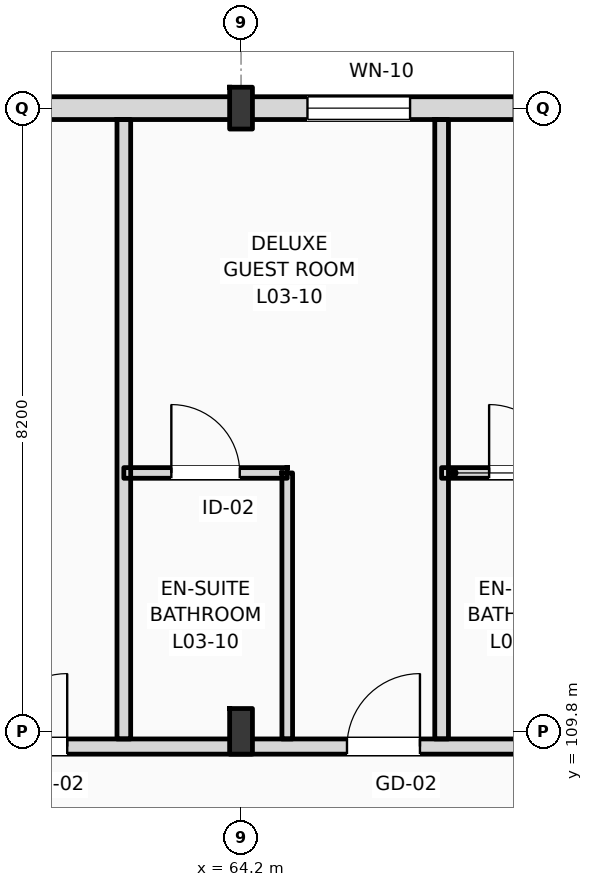
"""IFC4 building model, lengths in metres.
Left out: names, types, materials, properties, quantities, classifications, styles, units other than length and angle.
Written with IfcOpenShell. Run it as: python <this file> out.ifc"""

import sys

from ifc_helpers import new_model, si_unit, direction, frame, frame_2d, origin, origin_2d, place, context, subcontext, project, spatial, rectangle, i_section, extrude, element, fill, save


model = new_model("IFC4")
c1 = context("Model", 3, precision=1e-05, world=origin(), true_north=direction((0.0, 1.0)))
c2 = subcontext(c1, "Body", "Model", "MODEL_VIEW")
j1 = project(units=[si_unit("LENGTHUNIT", "METRE"), si_unit("PLANEANGLEUNIT", "RADIAN")], contexts=[c1])
p1 = place(None, origin())
s1 = spatial("IfcSite", under=j1, at=p1, CompositionType="ELEMENT")
p2 = place(p1, origin())
s2 = spatial("IfcBuilding", under=s1, at=p2, CompositionType="ELEMENT")
p3 = place(p2, frame((0.0, 0.0, 16.2)))
s3 = spatial("IfcBuildingStorey", under=s2, at=p3, CompositionType="ELEMENT", Elevation=16.2)
p4 = place(p3, frame((64.2, 109.8, 0.0), z_axis=(0.0, 0.0, 1.0), x_axis=(1.0, 0.0, 0.0)))
e1 = element("IfcColumn", 1, at=p4, inside=s3, PredefinedType="COLUMN", context=c2, shape_type="SweptSolid", body=[
    extrude(i_section(OverallWidth=0.3, OverallDepth=0.6, WebThickness=0.015, FlangeThickness=0.03, FilletRadius=0.027, at=origin_2d()), origin(), (0.0, 0.0, 1.0), 4.2),
])
p5 = place(p3, frame((64.2, 118.0, 0.0), z_axis=(0.0, 0.0, 1.0), x_axis=(1.0, 0.0, 0.0)))
e2 = element("IfcColumn", 2, at=p5, inside=s3, PredefinedType="COLUMN", context=c2, shape_type="SweptSolid", body=[
    extrude(i_section(OverallWidth=0.3, OverallDepth=0.55, WebThickness=0.015, FlangeThickness=0.029, FilletRadius=0.027, at=origin_2d()), origin(), (0.0, 0.0, 1.0), 4.2),
])
p6 = place(p3, frame((22.5, 118.0, 0.0), z_axis=(0.0, 0.0, 1.0), x_axis=(1.0, 0.0, 0.0)))
e3 = element("IfcWall", 3, at=p6, inside=s3, PredefinedType="STANDARD", context=c2, shape_type="SweptSolid", body=[
    extrude(rectangle(XDim=97.5, YDim=0.3, at=frame_2d((48.75, 0.0))), origin(), (0.0, 0.0, 1.0), 3.36),
])
p7 = place(p6, frame((3.721, 0.0, 0.9)))
e4 = element("IfcOpeningElement", 4, at=p7, cuts=e3, PredefinedType="OPENING", context=c2, shape_type="SweptSolid", body=[
    extrude(rectangle(XDim=0.9, YDim=1.8, at=frame_2d((0.45, 0.9))), frame((0.0, 0.16, 0.0), z_axis=(0.0, -1.0, 0.0), x_axis=(1.0, 0.0, 0.0)), (0.0, 0.0, 1.0), 0.32),
])
p8 = place(p6, frame((6.447, 0.0, 0.9)))
e5 = element("IfcOpeningElement", 5, at=p8, cuts=e3, PredefinedType="OPENING", context=c2, shape_type="SweptSolid", body=[
    extrude(rectangle(XDim=1.35, YDim=1.85, at=frame_2d((0.675, 0.925))), frame((0.0, 0.16, 0.0), z_axis=(0.0, -1.0, 0.0), x_axis=(1.0, 0.0, 0.0)), (0.0, 0.0, 1.0), 0.32),
])
p9 = place(p6, frame((11.363, 0.0, 0.9)))
e6 = element("IfcOpeningElement", 6, at=p9, cuts=e3, PredefinedType="OPENING", context=c2, shape_type="SweptSolid", body=[
    extrude(rectangle(XDim=1.5, YDim=1.9, at=frame_2d((0.75, 0.95))), frame((0.0, 0.16, 0.0), z_axis=(0.0, -1.0, 0.0), x_axis=(1.0, 0.0, 0.0)), (0.0, 0.0, 1.0), 0.32),
])
p10 = place(p6, frame((15.078, 0.0, 0.9)))
e7 = element("IfcOpeningElement", 7, at=p10, cuts=e3, PredefinedType="OPENING", context=c2, shape_type="SweptSolid", body=[
    extrude(rectangle(XDim=1.65, YDim=1.95, at=frame_2d((0.825, 0.975))), frame((0.0, 0.16, 0.0), z_axis=(0.0, -1.0, 0.0), x_axis=(1.0, 0.0, 0.0)), (0.0, 0.0, 1.0), 0.32),
])
p11 = place(p6, frame((19.395, 0.0, 0.9)))
e8 = element("IfcOpeningElement", 8, at=p11, cuts=e3, PredefinedType="OPENING", context=c2, shape_type="SweptSolid", body=[
    extrude(rectangle(XDim=1.8, YDim=2.0, at=frame_2d((0.9, 1.0))), frame((0.0, 0.16, 0.0), z_axis=(0.0, -1.0, 0.0), x_axis=(1.0, 0.0, 0.0)), (0.0, 0.0, 1.0), 0.32),
])
p12 = place(p6, frame((23.31, 0.0, 0.9)))
e9 = element("IfcOpeningElement", 9, at=p12, cuts=e3, PredefinedType="OPENING", context=c2, shape_type="SweptSolid", body=[
    extrude(rectangle(XDim=1.95, YDim=2.05, at=frame_2d((0.975, 1.025))), frame((0.0, 0.16, 0.0), z_axis=(0.0, -1.0, 0.0), x_axis=(1.0, 0.0, 0.0)), (0.0, 0.0, 1.0), 0.32),
])
p13 = place(p6, frame((28.026, 0.0, 0.9)))
e10 = element("IfcOpeningElement", 10, at=p13, cuts=e3, PredefinedType="OPENING", context=c2, shape_type="SweptSolid", body=[
    extrude(rectangle(XDim=2.1, YDim=2.1, at=frame_2d((1.05, 1.05))), frame((0.0, 0.16, 0.0), z_axis=(0.0, -1.0, 0.0), x_axis=(1.0, 0.0, 0.0)), (0.0, 0.0, 1.0), 0.32),
])
p14 = place(p6, frame((31.941, 0.0, 0.9)))
e11 = element("IfcOpeningElement", 11, at=p14, cuts=e3, PredefinedType="OPENING", context=c2, shape_type="SweptSolid", body=[
    extrude(rectangle(XDim=1.1, YDim=2.15, at=frame_2d((0.55, 1.075))), frame((0.0, 0.16, 0.0), z_axis=(0.0, -1.0, 0.0), x_axis=(1.0, 0.0, 0.0)), (0.0, 0.0, 1.0), 0.32),
])
p15 = place(p6, frame((36.657, 0.0, 0.9)))
e12 = element("IfcOpeningElement", 12, at=p15, cuts=e3, PredefinedType="OPENING", context=c2, shape_type="SweptSolid", body=[
    extrude(rectangle(XDim=2.4, YDim=2.2, at=frame_2d((1.2, 1.1))), frame((0.0, 0.16, 0.0), z_axis=(0.0, -1.0, 0.0), x_axis=(1.0, 0.0, 0.0)), (0.0, 0.0, 1.0), 0.32),
])
p16 = place(p6, frame((42.574, 0.0, 0.9)))
e13 = element("IfcOpeningElement", 13, at=p16, cuts=e3, PredefinedType="OPENING", context=c2, shape_type="SweptSolid", body=[
    extrude(rectangle(XDim=1.35, YDim=2.25, at=frame_2d((0.675, 1.125))), frame((0.0, 0.16, 0.0), z_axis=(0.0, -1.0, 0.0), x_axis=(1.0, 0.0, 0.0)), (0.0, 0.0, 1.0), 0.32),
])
p17 = place(p6, frame((45.289, 0.0, 0.9)))
e14 = element("IfcOpeningElement", 14, at=p17, cuts=e3, PredefinedType="OPENING", context=c2, shape_type="SweptSolid", body=[
    extrude(rectangle(XDim=2.7, YDim=2.28, at=frame_2d((1.35, 1.14))), frame((0.0, 0.16, 0.0), z_axis=(0.0, -1.0, 0.0), x_axis=(1.0, 0.0, 0.0)), (0.0, 0.0, 1.0), 0.32),
])
p18 = place(p6, frame((50.406, 0.0, 0.9)))
e15 = element("IfcOpeningElement", 15, at=p18, cuts=e3, PredefinedType="OPENING", context=c2, shape_type="SweptSolid", body=[
    extrude(rectangle(XDim=1.8, YDim=2.28, at=frame_2d((0.9, 1.14))), frame((0.0, 0.16, 0.0), z_axis=(0.0, -1.0, 0.0), x_axis=(1.0, 0.0, 0.0)), (0.0, 0.0, 1.0), 0.32),
])
p19 = place(p6, frame((53.922, 0.0, 0.9)))
e16 = element("IfcOpeningElement", 16, at=p19, cuts=e3, PredefinedType="OPENING", context=c2, shape_type="SweptSolid", body=[
    extrude(rectangle(XDim=1.8, YDim=2.28, at=frame_2d((0.9, 1.14))), frame((0.0, 0.16, 0.0), z_axis=(0.0, -1.0, 0.0), x_axis=(1.0, 0.0, 0.0)), (0.0, 0.0, 1.0), 0.32),
])
p20 = place(p6, frame((58.332, 0.0, 0.9)))
e17 = element("IfcOpeningElement", 17, at=p20, cuts=e3, PredefinedType="OPENING", context=c2, shape_type="SweptSolid", body=[
    extrude(rectangle(XDim=2.961, YDim=2.28, at=frame_2d((1.48, 1.14))), frame((0.0, 0.16, 0.0), z_axis=(0.0, -1.0, 0.0), x_axis=(1.0, 0.0, 0.0)), (0.0, 0.0, 1.0), 0.32),
])
p21 = place(p6, frame((62.513, 0.0, 0.9)))
e18 = element("IfcOpeningElement", 18, at=p21, cuts=e3, PredefinedType="OPENING", context=c2, shape_type="SweptSolid", body=[
    extrude(rectangle(XDim=1.8, YDim=2.28, at=frame_2d((0.9, 1.14))), frame((0.0, 0.16, 0.0), z_axis=(0.0, -1.0, 0.0), x_axis=(1.0, 0.0, 0.0)), (0.0, 0.0, 1.0), 0.32),
])
p22 = place(p6, frame((67.114, 0.0, 0.9)))
e19 = element("IfcOpeningElement", 19, at=p22, cuts=e3, PredefinedType="OPENING", context=c2, shape_type="SweptSolid", body=[
    extrude(rectangle(XDim=2.961, YDim=2.28, at=frame_2d((1.48, 1.14))), frame((0.0, 0.16, 0.0), z_axis=(0.0, -1.0, 0.0), x_axis=(1.0, 0.0, 0.0)), (0.0, 0.0, 1.0), 0.32),
])
p23 = place(p6, frame((73.695, 0.0, 0.9)))
e20 = element("IfcOpeningElement", 20, at=p23, cuts=e3, PredefinedType="OPENING", context=c2, shape_type="SweptSolid", body=[
    extrude(rectangle(XDim=1.1, YDim=2.28, at=frame_2d((0.55, 1.14))), frame((0.0, 0.16, 0.0), z_axis=(0.0, -1.0, 0.0), x_axis=(1.0, 0.0, 0.0)), (0.0, 0.0, 1.0), 0.32),
])
p24 = place(p6, frame((75.895, 0.0, 0.9)))
e21 = element("IfcOpeningElement", 21, at=p24, cuts=e3, PredefinedType="OPENING", context=c2, shape_type="SweptSolid", body=[
    extrude(rectangle(XDim=2.961, YDim=2.28, at=frame_2d((1.48, 1.14))), frame((0.0, 0.16, 0.0), z_axis=(0.0, -1.0, 0.0), x_axis=(1.0, 0.0, 0.0)), (0.0, 0.0, 1.0), 0.32),
])
p25 = place(p6, frame((81.676, 0.0, 0.9)))
e22 = element("IfcOpeningElement", 22, at=p25, cuts=e3, PredefinedType="OPENING", context=c2, shape_type="SweptSolid", body=[
    extrude(rectangle(XDim=1.8, YDim=2.28, at=frame_2d((0.9, 1.14))), frame((0.0, 0.16, 0.0), z_axis=(0.0, -1.0, 0.0), x_axis=(1.0, 0.0, 0.0)), (0.0, 0.0, 1.0), 0.32),
])
p26 = place(p6, frame((84.677, 0.0, 0.9)))
e23 = element("IfcOpeningElement", 23, at=p26, cuts=e3, PredefinedType="OPENING", context=c2, shape_type="SweptSolid", body=[
    extrude(rectangle(XDim=2.961, YDim=2.28, at=frame_2d((1.48, 1.14))), frame((0.0, 0.16, 0.0), z_axis=(0.0, -1.0, 0.0), x_axis=(1.0, 0.0, 0.0)), (0.0, 0.0, 1.0), 0.32),
])
p27 = place(p6, frame((89.999, 0.0, 0.9)))
e24 = element("IfcOpeningElement", 24, at=p27, cuts=e3, PredefinedType="OPENING", context=c2, shape_type="SweptSolid", body=[
    extrude(rectangle(XDim=1.1, YDim=1.5, at=frame_2d((0.55, 0.75))), frame((0.0, 0.16, 0.0), z_axis=(0.0, -1.0, 0.0), x_axis=(1.0, 0.0, 0.0)), (0.0, 0.0, 1.0), 0.32),
])
p28 = place(p6, frame((94.35, 0.0, 0.9)))
e25 = element("IfcOpeningElement", 25, at=p28, cuts=e3, PredefinedType="OPENING", context=c2, shape_type="SweptSolid", body=[
    extrude(rectangle(XDim=1.25, YDim=1.6, at=frame_2d((0.625, 0.8))), frame((0.0, 0.16, 0.0), z_axis=(0.0, -1.0, 0.0), x_axis=(1.0, 0.0, 0.0)), (0.0, 0.0, 1.0), 0.32),
])
p29 = place(p3, frame((10.65, 109.6, 0.0), z_axis=(0.0, 0.0, 1.0), x_axis=(1.0, 0.0, 0.0)))
e26 = element("IfcWall", 26, at=p29, inside=s3, PredefinedType="PARTITIONING", context=c2, shape_type="SweptSolid", body=[
    extrude(rectangle(XDim=109.21, YDim=0.2, at=frame_2d((54.605, 0.0))), origin(), (0.0, 0.0, 1.0), 3.36),
])
p30 = place(p29, frame((15.43, 0.0, 0.0)))
e27 = element("IfcOpeningElement", 27, at=p30, cuts=e26, PredefinedType="OPENING", context=c2, shape_type="SweptSolid", body=[
    extrude(rectangle(XDim=1.02, YDim=2.2, at=frame_2d((0.51, 1.1))), frame((0.0, 0.11, 0.0), z_axis=(0.0, -1.0, 0.0), x_axis=(1.0, 0.0, 0.0)), (0.0, 0.0, 1.0), 0.22),
])
p31 = place(p29, frame((19.537, 0.0, 0.0)))
e28 = element("IfcOpeningElement", 28, at=p31, cuts=e26, PredefinedType="OPENING", context=c2, shape_type="SweptSolid", body=[
    extrude(rectangle(XDim=1.02, YDim=2.2, at=frame_2d((0.51, 1.1))), frame((0.0, 0.11, 0.0), z_axis=(0.0, -1.0, 0.0), x_axis=(1.0, 0.0, 0.0)), (0.0, 0.0, 1.0), 0.22),
])
p32 = place(p29, frame((23.928, 0.0, 0.0)))
e29 = element("IfcOpeningElement", 29, at=p32, cuts=e26, PredefinedType="OPENING", context=c2, shape_type="SweptSolid", body=[
    extrude(rectangle(XDim=1.02, YDim=2.2, at=frame_2d((0.51, 1.1))), frame((0.0, 0.11, 0.0), z_axis=(0.0, -1.0, 0.0), x_axis=(1.0, 0.0, 0.0)), (0.0, 0.0, 1.0), 0.22),
])
p33 = place(p29, frame((26.169, 0.0, 0.0)))
e30 = element("IfcOpeningElement", 30, at=p33, cuts=e26, PredefinedType="OPENING", context=c2, shape_type="SweptSolid", body=[
    extrude(rectangle(XDim=1.02, YDim=2.2, at=frame_2d((0.51, 1.1))), frame((0.0, 0.11, 0.0), z_axis=(0.0, -1.0, 0.0), x_axis=(1.0, 0.0, 0.0)), (0.0, 0.0, 1.0), 0.22),
])
p34 = place(p29, frame((32.739, 0.0, 0.0)))
e31 = element("IfcOpeningElement", 31, at=p34, cuts=e26, PredefinedType="OPENING", context=c2, shape_type="SweptSolid", body=[
    extrude(rectangle(XDim=0.96, YDim=2.2, at=frame_2d((0.48, 1.1))), frame((0.0, 0.11, 0.0), z_axis=(0.0, -1.0, 0.0), x_axis=(1.0, 0.0, 0.0)), (0.0, 0.0, 1.0), 0.22),
])
p35 = place(p29, frame((34.98, 0.0, 0.0)))
e32 = element("IfcOpeningElement", 32, at=p35, cuts=e26, PredefinedType="OPENING", context=c2, shape_type="SweptSolid", body=[
    extrude(rectangle(XDim=0.96, YDim=2.2, at=frame_2d((0.48, 1.1))), frame((0.0, 0.11, 0.0), z_axis=(0.0, -1.0, 0.0), x_axis=(1.0, 0.0, 0.0)), (0.0, 0.0, 1.0), 0.22),
])
p36 = place(p29, frame((41.521, 0.0, 0.0)))
e33 = element("IfcOpeningElement", 33, at=p36, cuts=e26, PredefinedType="OPENING", context=c2, shape_type="SweptSolid", body=[
    extrude(rectangle(XDim=0.96, YDim=2.2, at=frame_2d((0.48, 1.1))), frame((0.0, 0.11, 0.0), z_axis=(0.0, -1.0, 0.0), x_axis=(1.0, 0.0, 0.0)), (0.0, 0.0, 1.0), 0.22),
])
p37 = place(p29, frame((43.512, 0.0, 0.0)))
e34 = element("IfcOpeningElement", 34, at=p37, cuts=e26, PredefinedType="OPENING", context=c2, shape_type="SweptSolid", body=[
    extrude(rectangle(XDim=0.96, YDim=2.2, at=frame_2d((0.48, 1.1))), frame((0.0, 0.11, 0.0), z_axis=(0.0, -1.0, 0.0), x_axis=(1.0, 0.0, 0.0)), (0.0, 0.0, 1.0), 0.22),
])
p38 = place(p29, frame((50.303, 0.0, 0.0)))
e35 = element("IfcOpeningElement", 35, at=p38, cuts=e26, PredefinedType="OPENING", context=c2, shape_type="SweptSolid", body=[
    extrude(rectangle(XDim=0.96, YDim=2.2, at=frame_2d((0.48, 1.1))), frame((0.0, 0.11, 0.0), z_axis=(0.0, -1.0, 0.0), x_axis=(1.0, 0.0, 0.0)), (0.0, 0.0, 1.0), 0.22),
])
p39 = place(p29, frame((54.944, 0.0, 0.0)))
e36 = element("IfcOpeningElement", 36, at=p39, cuts=e26, PredefinedType="OPENING", context=c2, shape_type="SweptSolid", body=[
    extrude(rectangle(XDim=0.96, YDim=2.2, at=frame_2d((0.48, 1.1))), frame((0.0, 0.11, 0.0), z_axis=(0.0, -1.0, 0.0), x_axis=(1.0, 0.0, 0.0)), (0.0, 0.0, 1.0), 0.22),
])
p40 = place(p29, frame((59.085, 0.0, 0.0)))
e37 = element("IfcOpeningElement", 37, at=p40, cuts=e26, PredefinedType="OPENING", context=c2, shape_type="SweptSolid", body=[
    extrude(rectangle(XDim=0.96, YDim=2.2, at=frame_2d((0.48, 1.1))), frame((0.0, 0.11, 0.0), z_axis=(0.0, -1.0, 0.0), x_axis=(1.0, 0.0, 0.0)), (0.0, 0.0, 1.0), 0.22),
])
p41 = place(p29, frame((63.476, 0.0, 0.0)))
e38 = element("IfcOpeningElement", 38, at=p41, cuts=e26, PredefinedType="OPENING", context=c2, shape_type="SweptSolid", body=[
    extrude(rectangle(XDim=0.96, YDim=2.2, at=frame_2d((0.48, 1.1))), frame((0.0, 0.11, 0.0), z_axis=(0.0, -1.0, 0.0), x_axis=(1.0, 0.0, 0.0)), (0.0, 0.0, 1.0), 0.22),
])
p42 = place(p29, frame((65.716, 0.0, 0.0)))
e39 = element("IfcOpeningElement", 39, at=p42, cuts=e26, PredefinedType="OPENING", context=c2, shape_type="SweptSolid", body=[
    extrude(rectangle(XDim=0.96, YDim=2.2, at=frame_2d((0.48, 1.1))), frame((0.0, 0.11, 0.0), z_axis=(0.0, -1.0, 0.0), x_axis=(1.0, 0.0, 0.0)), (0.0, 0.0, 1.0), 0.22),
])
p43 = place(p29, frame((72.257, 0.0, 0.0)))
e40 = element("IfcOpeningElement", 40, at=p43, cuts=e26, PredefinedType="OPENING", context=c2, shape_type="SweptSolid", body=[
    extrude(rectangle(XDim=0.96, YDim=2.2, at=frame_2d((0.48, 1.1))), frame((0.0, 0.11, 0.0), z_axis=(0.0, -1.0, 0.0), x_axis=(1.0, 0.0, 0.0)), (0.0, 0.0, 1.0), 0.22),
])
p44 = place(p29, frame((74.498, 0.0, 0.0)))
e41 = element("IfcOpeningElement", 41, at=p44, cuts=e26, PredefinedType="OPENING", context=c2, shape_type="SweptSolid", body=[
    extrude(rectangle(XDim=0.96, YDim=2.2, at=frame_2d((0.48, 1.1))), frame((0.0, 0.11, 0.0), z_axis=(0.0, -1.0, 0.0), x_axis=(1.0, 0.0, 0.0)), (0.0, 0.0, 1.0), 0.22),
])
p45 = place(p29, frame((81.039, 0.0, 0.0)))
e42 = element("IfcOpeningElement", 42, at=p45, cuts=e26, PredefinedType="OPENING", context=c2, shape_type="SweptSolid", body=[
    extrude(rectangle(XDim=0.96, YDim=2.2, at=frame_2d((0.48, 1.1))), frame((0.0, 0.11, 0.0), z_axis=(0.0, -1.0, 0.0), x_axis=(1.0, 0.0, 0.0)), (0.0, 0.0, 1.0), 0.22),
])
p46 = place(p29, frame((85.68, 0.0, 0.0)))
e43 = element("IfcOpeningElement", 43, at=p46, cuts=e26, PredefinedType="OPENING", context=c2, shape_type="SweptSolid", body=[
    extrude(rectangle(XDim=0.96, YDim=2.2, at=frame_2d((0.48, 1.1))), frame((0.0, 0.11, 0.0), z_axis=(0.0, -1.0, 0.0), x_axis=(1.0, 0.0, 0.0)), (0.0, 0.0, 1.0), 0.22),
])
p47 = place(p29, frame((89.82, 0.0, 0.0)))
e44 = element("IfcOpeningElement", 44, at=p47, cuts=e26, PredefinedType="OPENING", context=c2, shape_type="SweptSolid", body=[
    extrude(rectangle(XDim=0.96, YDim=2.2, at=frame_2d((0.48, 1.1))), frame((0.0, 0.11, 0.0), z_axis=(0.0, -1.0, 0.0), x_axis=(1.0, 0.0, 0.0)), (0.0, 0.0, 1.0), 0.22),
])
p48 = place(p29, frame((94.211, 0.0, 0.0)))
e45 = element("IfcOpeningElement", 45, at=p48, cuts=e26, PredefinedType="OPENING", context=c2, shape_type="SweptSolid", body=[
    extrude(rectangle(XDim=0.96, YDim=2.2, at=frame_2d((0.48, 1.1))), frame((0.0, 0.11, 0.0), z_axis=(0.0, -1.0, 0.0), x_axis=(1.0, 0.0, 0.0)), (0.0, 0.0, 1.0), 0.22),
])
p49 = place(p29, frame((98.602, 0.0, 0.0)))
e46 = element("IfcOpeningElement", 46, at=p49, cuts=e26, PredefinedType="OPENING", context=c2, shape_type="SweptSolid", body=[
    extrude(rectangle(XDim=0.96, YDim=2.2, at=frame_2d((0.48, 1.1))), frame((0.0, 0.11, 0.0), z_axis=(0.0, -1.0, 0.0), x_axis=(1.0, 0.0, 0.0)), (0.0, 0.0, 1.0), 0.22),
])
p50 = place(p29, frame((102.993, 0.0, 0.0)))
e47 = element("IfcOpeningElement", 47, at=p50, cuts=e26, PredefinedType="OPENING", context=c2, shape_type="SweptSolid", body=[
    extrude(rectangle(XDim=0.96, YDim=2.2, at=frame_2d((0.48, 1.1))), frame((0.0, 0.11, 0.0), z_axis=(0.0, -1.0, 0.0), x_axis=(1.0, 0.0, 0.0)), (0.0, 0.0, 1.0), 0.22),
])
p51 = place(p29, frame((105.269, 0.0, 0.0)))
e48 = element("IfcOpeningElement", 48, at=p51, cuts=e26, PredefinedType="OPENING", context=c2, shape_type="SweptSolid", body=[
    extrude(rectangle(XDim=0.96, YDim=2.2, at=frame_2d((0.48, 1.1))), frame((0.0, 0.11, 0.0), z_axis=(0.0, -1.0, 0.0), x_axis=(1.0, 0.0, 0.0)), (0.0, 0.0, 1.0), 0.22),
])
p52 = place(p29, frame((2.716, 0.0, 0.0)))
e49 = element("IfcOpeningElement", 49, at=p52, cuts=e26, PredefinedType="OPENING", context=c2, shape_type="SweptSolid", body=[
    extrude(rectangle(XDim=1.35, YDim=2.25, at=frame_2d((0.675, 1.125))), frame((0.0, 0.11, 0.0), z_axis=(0.0, -1.0, 0.0), x_axis=(1.0, 0.0, 0.0)), (0.0, 0.0, 1.0), 0.22),
])
p53 = place(p29, frame((6.65, 0.0, 0.0)))
e50 = element("IfcOpeningElement", 50, at=p53, cuts=e26, PredefinedType="OPENING", context=c2, shape_type="SweptSolid", body=[
    extrude(rectangle(XDim=1.35, YDim=2.25, at=frame_2d((0.675, 1.125))), frame((0.0, 0.11, 0.0), z_axis=(0.0, -1.0, 0.0), x_axis=(1.0, 0.0, 0.0)), (0.0, 0.0, 1.0), 0.22),
])
p54 = place(p29, frame((10.583, 0.0, 0.0)))
e51 = element("IfcOpeningElement", 51, at=p54, cuts=e26, PredefinedType="OPENING", context=c2, shape_type="SweptSolid", body=[
    extrude(rectangle(XDim=1.35, YDim=2.25, at=frame_2d((0.675, 1.125))), frame((0.0, 0.11, 0.0), z_axis=(0.0, -1.0, 0.0), x_axis=(1.0, 0.0, 0.0)), (0.0, 0.0, 1.0), 0.22),
])
p55 = place(p3, frame((62.658, 109.7, 0.0), z_axis=(0.0, 0.0, 1.0), x_axis=(0.0, 1.0, 0.0)))
e52 = element("IfcWall", 52, at=p55, inside=s3, PredefinedType="PARTITIONING", context=c2, shape_type="SweptSolid", body=[
    extrude(rectangle(XDim=8.15, YDim=0.18, at=frame_2d((4.075, 0.0))), origin(), (0.0, 0.0, 1.0), 3.92),
])
p56 = place(p3, frame((66.839, 109.7, 0.0), z_axis=(0.0, 0.0, 1.0), x_axis=(0.0, 1.0, 0.0)))
e53 = element("IfcWall", 53, at=p56, inside=s3, PredefinedType="PARTITIONING", context=c2, shape_type="SweptSolid", body=[
    extrude(rectangle(XDim=8.15, YDim=0.18, at=frame_2d((4.075, 0.0))), origin(), (0.0, 0.0, 1.0), 3.61),
])
p57 = place(p3, frame((64.808, 109.7, 0.0), z_axis=(0.0, 0.0, 1.0), x_axis=(0.0, 1.0, 0.0)))
e54 = element("IfcWall", 54, at=p57, inside=s3, PredefinedType="PARTITIONING", context=c2, shape_type="SweptSolid", body=[
    extrude(rectangle(XDim=3.5, YDim=0.14, at=frame_2d((1.75, 0.0))), origin(), (0.0, 0.0, 1.0), 3.92),
])
p58 = place(p3, frame((62.658, 113.2, 0.0), z_axis=(0.0, 0.0, 1.0), x_axis=(1.0, 0.0, 0.0)))
e55 = element("IfcWall", 55, at=p58, inside=s3, PredefinedType="PARTITIONING", context=c2, shape_type="SweptSolid", body=[
    extrude(rectangle(XDim=2.15, YDim=0.14, at=frame_2d((1.075, 0.0))), origin(), (0.0, 0.0, 1.0), 3.92),
])
p59 = place(p58, frame((0.625, 0.0, 0.0)))
e56 = element("IfcOpeningElement", 56, at=p59, cuts=e55, PredefinedType="OPENING", context=c2, shape_type="SweptSolid", body=[
    extrude(rectangle(XDim=0.9, YDim=2.1, at=frame_2d((0.45, 1.05))), frame((0.0, 0.08, 0.0), z_axis=(0.0, -1.0, 0.0), x_axis=(1.0, 0.0, 0.0)), (0.0, 0.0, 1.0), 0.16),
])
p60 = place(p3, frame((66.839, 113.2, 0.0), z_axis=(0.0, 0.0, 1.0), x_axis=(1.0, 0.0, 0.0)))
e57 = element("IfcWall", 57, at=p60, inside=s3, PredefinedType="PARTITIONING", context=c2, shape_type="SweptSolid", body=[
    extrude(rectangle(XDim=2.15, YDim=0.14, at=frame_2d((1.075, 0.0))), origin(), (0.0, 0.0, 1.0), 3.92),
])
p61 = place(p60, frame((0.625, 0.0, 0.0)))
e58 = element("IfcOpeningElement", 58, at=p61, cuts=e57, PredefinedType="OPENING", context=c2, shape_type="SweptSolid", body=[
    extrude(rectangle(XDim=0.9, YDim=2.1, at=frame_2d((0.45, 1.05))), frame((0.0, 0.08, 0.0), z_axis=(0.0, -1.0, 0.0), x_axis=(1.0, 0.0, 0.0)), (0.0, 0.0, 1.0), 0.16),
])
p62 = place(p16, origin())
e59 = element("IfcWindow", 59, at=p62, inside=s3, PartitioningType="DOUBLE_PANEL_VERTICAL", PredefinedType="WINDOW", context=c2, shape_type="SweptSolid", body=[
    extrude(rectangle(XDim=1.35, YDim=2.25, at=frame_2d((0.675, 1.125))), frame((0.0, 0.03, 0.0), z_axis=(0.0, -1.0, 0.0), x_axis=(1.0, 0.0, 0.0)), (0.0, 0.0, 1.0), 0.06),
])
fill(e13, e59)
p63 = place(p38, origin())
e60 = element("IfcDoor", 60, at=p63, inside=s3, OperationType="SINGLE_SWING_RIGHT", PredefinedType="DOOR", context=c2, shape_type="SweptSolid", body=[
    extrude(rectangle(XDim=0.96, YDim=2.2, at=frame_2d((0.48, 1.1))), frame((0.0, 0.025, 0.0), z_axis=(0.0, -1.0, 0.0), x_axis=(1.0, 0.0, 0.0)), (0.0, 0.0, 1.0), 0.05),
])
fill(e35, e60)
p64 = place(p39, origin())
e61 = element("IfcDoor", 61, at=p64, inside=s3, OperationType="SINGLE_SWING_RIGHT", PredefinedType="DOOR", context=c2, shape_type="SweptSolid", body=[
    extrude(rectangle(XDim=0.96, YDim=2.2, at=frame_2d((0.48, 1.1))), frame((0.0, 0.025, 0.0), z_axis=(0.0, -1.0, 0.0), x_axis=(1.0, 0.0, 0.0)), (0.0, 0.0, 1.0), 0.05),
])
fill(e36, e61)
p65 = place(p59, origin())
e62 = element("IfcDoor", 62, at=p65, inside=s3, OperationType="SINGLE_SWING_LEFT", PredefinedType="DOOR", context=c2, shape_type="SweptSolid", body=[
    extrude(rectangle(XDim=0.9, YDim=2.1, at=frame_2d((0.45, 1.05))), frame((0.0, 0.025, 0.0), z_axis=(0.0, -1.0, 0.0), x_axis=(1.0, 0.0, 0.0)), (0.0, 0.0, 1.0), 0.05),
])
fill(e56, e62)
p66 = place(p61, origin())
e63 = element("IfcDoor", 63, at=p66, inside=s3, OperationType="SINGLE_SWING_LEFT", PredefinedType="DOOR", context=c2, shape_type="SweptSolid", body=[
    extrude(rectangle(XDim=0.9, YDim=2.1, at=frame_2d((0.45, 1.05))), frame((0.0, 0.025, 0.0), z_axis=(0.0, -1.0, 0.0), x_axis=(1.0, 0.0, 0.0)), (0.0, 0.0, 1.0), 0.05),
])
fill(e58, e63)
save(model, sys.argv[1])
